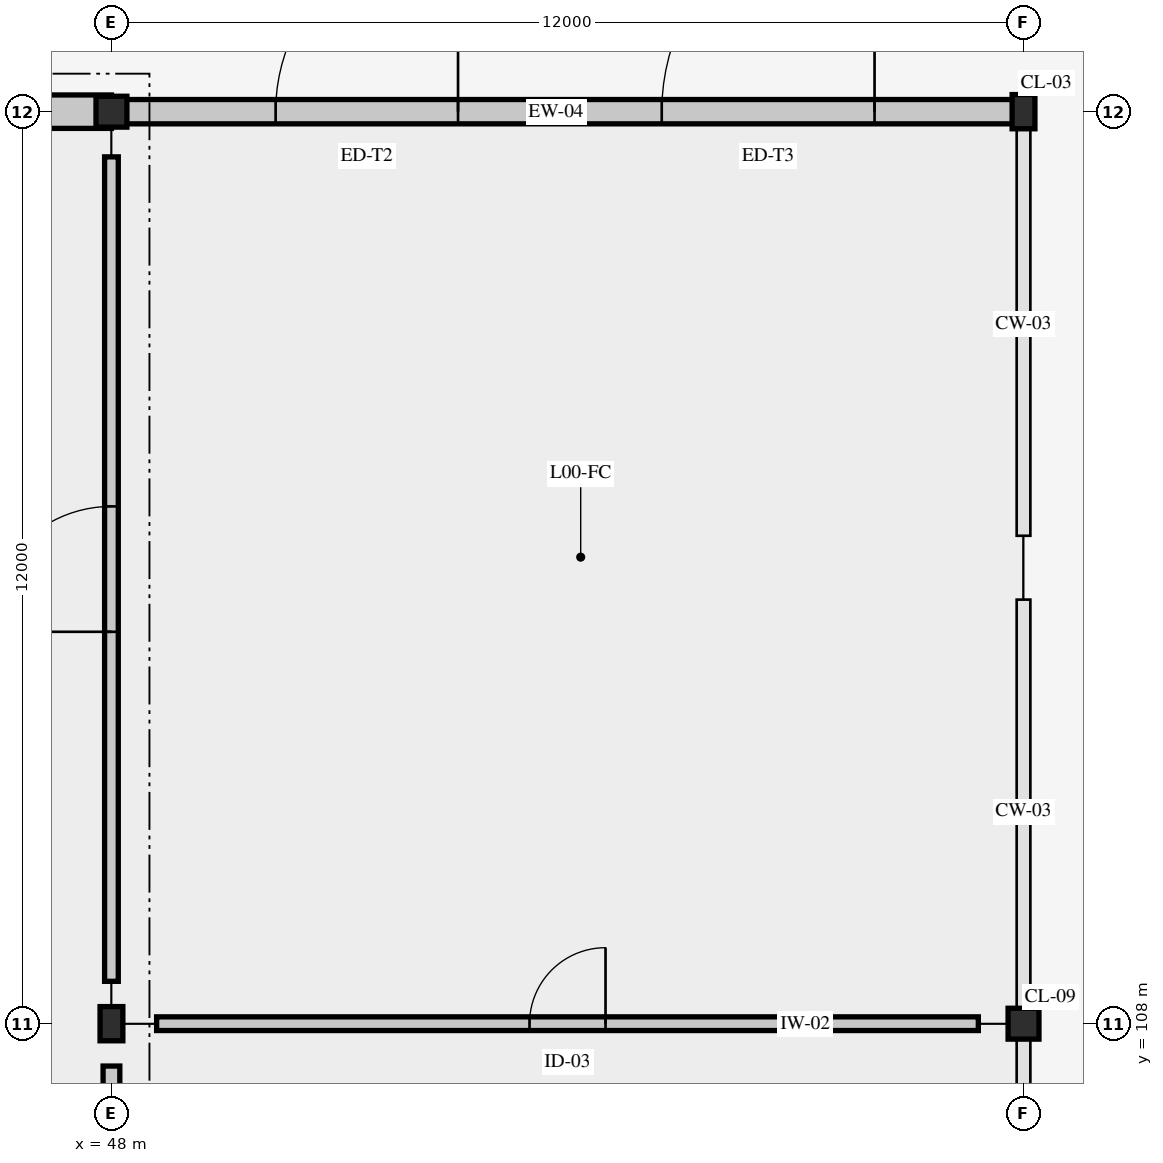
"""IFC4 building model, lengths in metres.
Left out: names, types, materials, properties, quantities, classifications, styles, units other than length and angle.
Written with IfcOpenShell. Run it as: python <this file> out.ifc"""

import sys

from ifc_helpers import new_model, si_unit, direction, frame, frame_2d, origin, origin_2d, place, context, subcontext, project, spatial, rectangle, hollow_circle, i_section, extrude, element, fill, save


model = new_model("IFC4")
c1 = context("Model", 3, precision=1e-05, world=origin(), true_north=direction((0.0, 1.0)))
c2 = subcontext(c1, "Body", "Model", "MODEL_VIEW")
j1 = project(units=[si_unit("LENGTHUNIT", "METRE"), si_unit("PLANEANGLEUNIT", "RADIAN")], contexts=[c1])
p1 = place(None, origin())
s1 = spatial("IfcSite", under=j1, at=p1, CompositionType="ELEMENT")
p2 = place(p1, origin())
s2 = spatial("IfcBuilding", under=s1, at=p2, CompositionType="ELEMENT")
p3 = place(p2, origin())
s3 = spatial("IfcBuildingStorey", under=s2, at=p3, CompositionType="ELEMENT", Elevation=0.0)
p4 = place(p3, frame((48.0, 108.0, 0.0), z_axis=(0.0, 0.0, 1.0), x_axis=(1.0, 0.0, 0.0)))
e1 = element("IfcColumn", 1, at=p4, inside=s3, PredefinedType="COLUMN", context=c2, shape_type="SweptSolid", body=[
    extrude(i_section(OverallWidth=0.3, OverallDepth=0.45, WebThickness=0.014, FlangeThickness=0.026, FilletRadius=0.027, at=origin_2d()), origin(), (0.0, 0.0, 1.0), 5.4),
])
for number, where, z_axis, x_axis in (
    (2, (48.0, 120.0, 0.0), (0.0, 0.0, 1.0), (1.0, 0.0, 0.0)),
    (3, (60.0, 108.0, 0.0), (0.0, 0.0, 1.0), (1.0, 0.0, 0.0)),
):
    element("IfcColumn", number, at=place(p3, frame(where, z_axis=z_axis, x_axis=x_axis)), inside=s3, PredefinedType="COLUMN", context=c2, shape_type="SweptSolid", body=[
        extrude(hollow_circle(Radius=0.203, WallThickness=0.016, at=origin_2d()), origin(), (0.0, 0.0, 1.0), 5.4),
    ])
p5 = place(p3, frame((60.0, 120.0, 0.0), z_axis=(0.0, 0.0, 1.0), x_axis=(1.0, 0.0, 0.0)))
e4 = element("IfcColumn", 4, at=p5, inside=s3, PredefinedType="COLUMN", context=c2, shape_type="SweptSolid", body=[
    extrude(i_section(OverallWidth=0.3, OverallDepth=0.45, WebThickness=0.014, FlangeThickness=0.026, FilletRadius=0.027, at=origin_2d()), origin(), (0.0, 0.0, 1.0), 5.4),
])
p6 = place(p3, frame((48.0, 120.0, 0.0), z_axis=(0.0, 0.0, 1.0), x_axis=(-1.0, 0.0, 0.0)))
e5 = element("IfcWall", 5, at=p6, inside=s3, PredefinedType="SOLIDWALL", context=c2, shape_type="SweptSolid", body=[
    extrude(rectangle(XDim=12.0, YDim=0.44, at=frame_2d((6.0, 0.0))), origin(), (0.0, 0.0, 1.0), 4.56),
])
p7 = place(p6, frame((1.96, 0.0, 0.0)))
e6 = element("IfcOpeningElement", 6, at=p7, cuts=e5, PredefinedType="OPENING", context=c2, shape_type="SweptSolid", body=[
    extrude(rectangle(XDim=2.8, YDim=2.8, at=frame_2d((1.4, 1.4))), frame((0.0, 0.23, 0.0), z_axis=(0.0, -1.0, 0.0), x_axis=(1.0, 0.0, 0.0)), (0.0, 0.0, 1.0), 0.46),
])
p8 = place(p6, frame((7.44, 0.0, 0.0)))
e7 = element("IfcOpeningElement", 7, at=p8, cuts=e5, PredefinedType="OPENING", context=c2, shape_type="SweptSolid", body=[
    extrude(rectangle(XDim=2.4, YDim=2.6, at=frame_2d((1.2, 1.3))), frame((0.0, 0.23, 0.0), z_axis=(0.0, -1.0, 0.0), x_axis=(1.0, 0.0, 0.0)), (0.0, 0.0, 1.0), 0.46),
])
p9 = place(p3, frame((60.0, 120.0, 0.0), z_axis=(0.0, 0.0, 1.0), x_axis=(-1.0, 0.0, 0.0)))
e8 = element("IfcWall", 8, at=p9, inside=s3, PredefinedType="SOLIDWALL", context=c2, shape_type="SweptSolid", body=[
    extrude(rectangle(XDim=12.0, YDim=0.32, at=frame_2d((6.0, 0.0))), origin(), (0.0, 0.0, 1.0), 4.56),
])
p10 = place(p9, frame((1.96, 0.0, 0.0)))
e9 = element("IfcOpeningElement", 9, at=p10, cuts=e8, PredefinedType="OPENING", context=c2, shape_type="SweptSolid", body=[
    extrude(rectangle(XDim=2.8, YDim=2.8, at=frame_2d((1.4, 1.4))), frame((0.0, 0.17, 0.0), z_axis=(0.0, -1.0, 0.0), x_axis=(1.0, 0.0, 0.0)), (0.0, 0.0, 1.0), 0.34),
])
p11 = place(p9, frame((7.44, 0.0, 0.0)))
e10 = element("IfcOpeningElement", 10, at=p11, cuts=e8, PredefinedType="OPENING", context=c2, shape_type="SweptSolid", body=[
    extrude(rectangle(XDim=2.4, YDim=2.6, at=frame_2d((1.2, 1.3))), frame((0.0, 0.17, 0.0), z_axis=(0.0, -1.0, 0.0), x_axis=(1.0, 0.0, 0.0)), (0.0, 0.0, 1.0), 0.34),
])
p12 = place(p3, frame((48.0, 108.557, 0.0), z_axis=(0.0, 0.0, 1.0), x_axis=(0.0, 1.0, 0.0)))
e11 = element("IfcWall", 11, at=p12, inside=s3, PredefinedType="PARTITIONING", context=c2, shape_type="SweptSolid", body=[
    extrude(rectangle(XDim=10.848, YDim=0.18, at=frame_2d((5.424, 0.0))), origin(), (0.0, 0.0, 1.0), 4.63),
])
p13 = place(p12, frame((4.599, 0.0, 0.0)))
e12 = element("IfcOpeningElement", 12, at=p13, cuts=e11, PredefinedType="OPENING", context=c2, shape_type="SweptSolid", body=[
    extrude(rectangle(XDim=1.65, YDim=2.35, at=frame_2d((0.825, 1.175))), frame((0.0, 0.1, 0.0), z_axis=(0.0, -1.0, 0.0), x_axis=(1.0, 0.0, 0.0)), (0.0, 0.0, 1.0), 0.2),
])
p14 = place(p3, frame((48.0, 90.938, 0.0), z_axis=(0.0, 0.0, 1.0), x_axis=(0.0, 1.0, 0.0)))
e13 = element("IfcWall", 13, at=p14, inside=s3, PredefinedType="PARTITIONING", context=c2, shape_type="SweptSolid", body=[
    extrude(rectangle(XDim=16.505, YDim=0.22, at=frame_2d((8.252, 0.0))), origin(), (0.0, 0.0, 1.0), 4.53),
])
p15 = place(p14, frame((7.278, 0.0, 0.0)))
e14 = element("IfcOpeningElement", 14, at=p15, cuts=e13, PredefinedType="OPENING", context=c2, shape_type="SweptSolid", body=[
    extrude(rectangle(XDim=1.95, YDim=2.45, at=frame_2d((0.975, 1.225))), frame((0.0, 0.12, 0.0), z_axis=(0.0, -1.0, 0.0), x_axis=(1.0, 0.0, 0.0)), (0.0, 0.0, 1.0), 0.24),
])
p16 = place(p3, frame((48.594, 108.0, 0.0), z_axis=(0.0, 0.0, 1.0), x_axis=(1.0, 0.0, 0.0)))
e15 = element("IfcWall", 15, at=p16, inside=s3, PredefinedType="PARTITIONING", context=c2, shape_type="SweptSolid", body=[
    extrude(rectangle(XDim=10.811, YDim=0.18, at=frame_2d((5.406, 0.0))), origin(), (0.0, 0.0, 1.0), 4.53),
])
p17 = place(p16, frame((4.906, 0.0, 0.0)))
e16 = element("IfcOpeningElement", 16, at=p17, cuts=e15, PredefinedType="OPENING", context=c2, shape_type="SweptSolid", body=[
    extrude(rectangle(XDim=1.0, YDim=2.2, at=frame_2d((0.5, 1.1))), frame((0.0, 0.1, 0.0), z_axis=(0.0, -1.0, 0.0), x_axis=(1.0, 0.0, 0.0)), (0.0, 0.0, 1.0), 0.2),
])
p18 = place(p10, frame((2.8, 0.0, 0.0), z_axis=(0.0, 0.0, 1.0), x_axis=(-1.0, 0.0, 0.0)))
e17 = element("IfcDoor", 17, at=p18, inside=s3, OperationType="DOUBLE_DOOR_SINGLE_SWING", PredefinedType="DOOR", context=c2, shape_type="SweptSolid", body=[
    extrude(rectangle(XDim=2.8, YDim=2.8, at=frame_2d((1.4, 1.4))), frame((0.0, 0.025, 0.0), z_axis=(0.0, -1.0, 0.0), x_axis=(1.0, 0.0, 0.0)), (0.0, 0.0, 1.0), 0.05),
])
fill(e9, e17)
p19 = place(p11, frame((2.4, 0.0, 0.0), z_axis=(0.0, 0.0, 1.0), x_axis=(-1.0, 0.0, 0.0)))
e18 = element("IfcDoor", 18, at=p19, inside=s3, OperationType="DOUBLE_DOOR_SINGLE_SWING", PredefinedType="DOOR", context=c2, shape_type="SweptSolid", body=[
    extrude(rectangle(XDim=2.4, YDim=2.6, at=frame_2d((1.2, 1.3))), frame((0.0, 0.025, 0.0), z_axis=(0.0, -1.0, 0.0), x_axis=(1.0, 0.0, 0.0)), (0.0, 0.0, 1.0), 0.05),
])
fill(e10, e18)
p20 = place(p13, origin())
e19 = element("IfcDoor", 19, at=p20, inside=s3, OperationType="DOUBLE_DOOR_SINGLE_SWING", PredefinedType="DOOR", context=c2, shape_type="SweptSolid", body=[
    extrude(rectangle(XDim=1.65, YDim=2.35, at=frame_2d((0.825, 1.175))), frame((0.0, 0.025, 0.0), z_axis=(0.0, -1.0, 0.0), x_axis=(1.0, 0.0, 0.0)), (0.0, 0.0, 1.0), 0.05),
])
fill(e12, e19)
p21 = place(p17, origin())
e20 = element("IfcDoor", 20, at=p21, inside=s3, OperationType="SINGLE_SWING_RIGHT", PredefinedType="DOOR", context=c2, shape_type="SweptSolid", body=[
    extrude(rectangle(XDim=1.0, YDim=2.2, at=frame_2d((0.5, 1.1))), frame((0.0, 0.025, 0.0), z_axis=(0.0, -1.0, 0.0), x_axis=(1.0, 0.0, 0.0)), (0.0, 0.0, 1.0), 0.05),
])
fill(e16, e20)
save(model, sys.argv[1])
